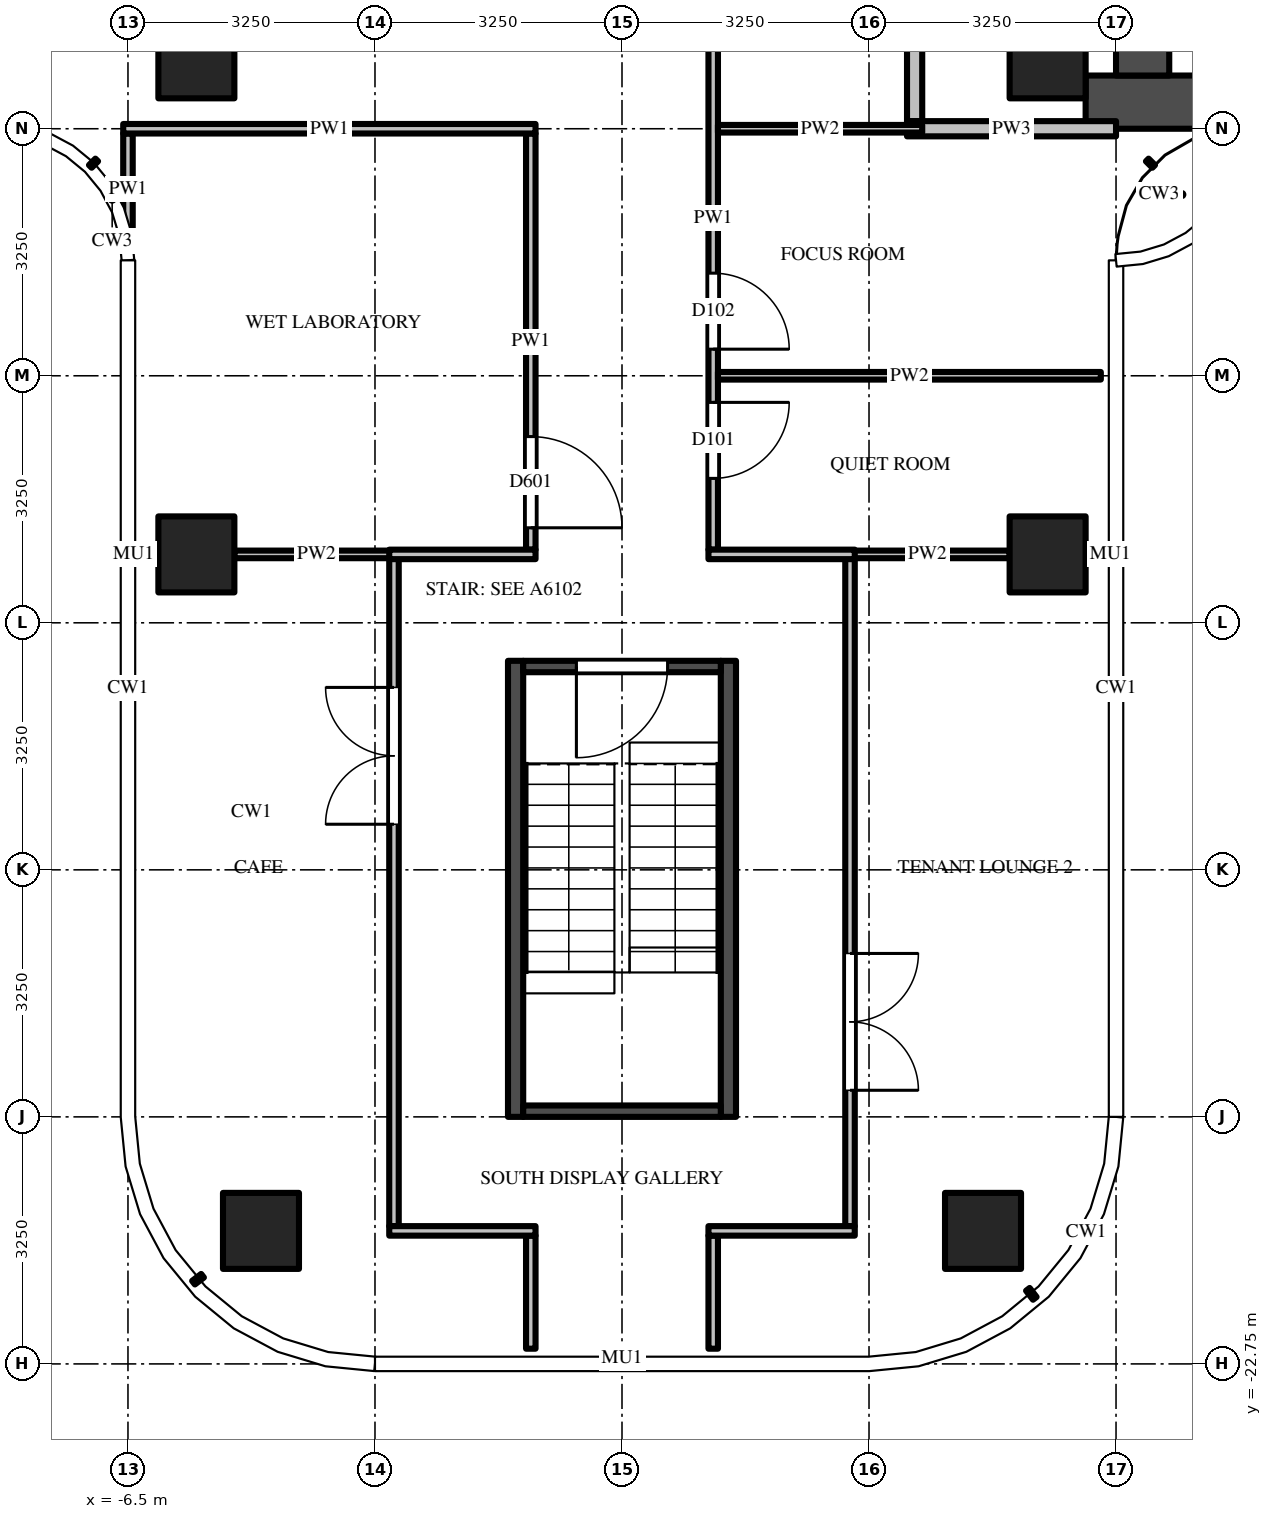
"""IFC4 building model, lengths in metres.
Left out: names, types, materials, properties, quantities, classifications, styles, units other than length and angle.
Written with IfcOpenShell. Run it as: python <this file> out.ifc"""

import sys

from ifc_helpers import new_model, si_unit, direction, frame, frame_2d, origin, origin_2d, place, context, subcontext, project, spatial, rectangle, extrude, source, transform, mapped, element, fill, save


model = new_model("IFC4")
c1 = context("Model", 3, precision=1e-05, world=origin(), true_north=direction((0.0, 1.0)))
c2 = subcontext(c1, "Body", "Model", "MODEL_VIEW")
j1 = project(units=[si_unit("LENGTHUNIT", "METRE"), si_unit("PLANEANGLEUNIT", "RADIAN")], contexts=[c1])
p1 = place(None, origin())
s1 = spatial("IfcSite", under=j1, at=p1, CompositionType="ELEMENT")
p2 = place(p1, origin())
s2 = spatial("IfcBuilding", under=s1, at=p2, CompositionType="ELEMENT")
p3 = place(p2, frame((0.0, 0.0, 295.0)))
s3 = spatial("IfcBuildingStorey", under=s2, at=p3, CompositionType="ELEMENT", Elevation=295.0)
m1 = source(origin(), c2, "Body", "SweptSolid", [
    extrude(rectangle(XDim=1.0, YDim=1.0, at=origin_2d()), origin(), (0.0, 0.0, 1.0), 3.9),
])
for number, where, z_axis, x_axis in (
    (1, (5.6, -5.6, 0.0), (0.0, 0.0, 1.0), (1.0, 0.0, 0.0)),
    (2, (-5.6, -5.6, 0.0), (0.0, 0.0, 1.0), (1.0, 0.0, 0.0)),
    (3, (5.6, -12.1, 0.0), (0.0, 0.0, 1.0), (1.0, 0.0, 0.0)),
    (4, (4.75, -21.0, 0.0), (0.0, 0.0, 1.0), (1.0, 0.0, 0.0)),
    (5, (-5.6, -12.1, 0.0), (0.0, 0.0, 1.0), (1.0, 0.0, 0.0)),
    (6, (-4.75, -21.0, 0.0), (0.0, 0.0, 1.0), (1.0, 0.0, 0.0)),
):
    element("IfcColumn", number, at=place(p3, frame(where, z_axis=z_axis, x_axis=x_axis)), inside=s3, PredefinedType="COLUMN", context=c2, shape_type="MappedRepresentation", body=[
        mapped(m1, transform((0.0, 0.0, 0.0))),
    ])
m2 = source(origin(), c2, "Body", "SweptSolid", [
    extrude(rectangle(XDim=16.65, YDim=0.7, at=frame_2d((8.325, 0.0))), origin(), (0.0, 0.0, 1.0), 3.7),
])
p4 = place(p3, frame((6.1, -6.15, 0.0), z_axis=(0.0, 0.0, 1.0), x_axis=(1.0, 0.0, 0.0)))
e7 = element("IfcWall", 7, at=p4, inside=s3, PredefinedType="SHEAR", context=c2, shape_type="MappedRepresentation", body=[
    mapped(m2, transform((0.0, 0.0, 0.0))),
])
m3 = source(origin(), c2, "Body", "SweptSolid", [
    extrude(rectangle(XDim=9.05, YDim=0.7, at=frame_2d((4.525, 0.0))), origin(), (0.0, 0.0, 1.0), 3.7),
])
p5 = place(p3, frame((6.85, -5.8, 0.0), z_axis=(0.0, 0.0, 1.0), x_axis=(0.0, 1.0, 0.0)))
e8 = element("IfcWall", 8, at=p5, inside=s3, PredefinedType="SHEAR", context=c2, shape_type="MappedRepresentation", body=[
    mapped(m3, transform((0.0, 0.0, 0.0))),
])
m4 = source(origin(), c2, "Body", "SweptSolid", [
    extrude(rectangle(XDim=1.8, YDim=2.1, at=frame_2d((0.9, 1.05))), frame((0.0, 0.36, 0.0), z_axis=(0.0, -1.0, 0.0), x_axis=(1.0, 0.0, 0.0)), (0.0, 0.0, 1.0), 0.72),
])
p6 = place(p5, frame((3.15, 0.0, 0.0)))
e9 = element("IfcOpeningElement", 9, at=p6, cuts=e8, PredefinedType="OPENING", context=c2, shape_type="MappedRepresentation", body=[
    mapped(m4, transform((0.0, 0.0, 0.0))),
])
m5 = source(origin(), c2, "Body", "SweptSolid", [
    extrude(rectangle(XDim=6.0, YDim=0.2, at=frame_2d((3.0, 0.0))), origin(), (0.0, 0.0, 1.0), 3.7),
])
for number, where, z_axis, x_axis in (
    (10, (1.4, -13.5, 0.0), (0.0, 0.0, 1.0), (0.0, -1.0, 0.0)),
    (11, (-1.4, -13.5, 0.0), (0.0, 0.0, 1.0), (0.0, -1.0, 0.0)),
):
    element("IfcWall", number, at=place(p3, frame(where, z_axis=z_axis, x_axis=x_axis)), inside=s3, PredefinedType="SHEAR", context=c2, shape_type="MappedRepresentation", body=[
        mapped(m5, transform((0.0, 0.0, 0.0))),
    ])
m6 = source(origin(), c2, "Body", "SweptSolid", [
    extrude(rectangle(XDim=2.6, YDim=0.15, at=frame_2d((1.3, 0.0))), origin(), (0.0, 0.0, 1.0), 3.7),
])
p7 = place(p3, frame((1.3, -13.575, 0.0), z_axis=(0.0, 0.0, 1.0), x_axis=(-1.0, 0.0, 0.0)))
e12 = element("IfcWall", 12, at=p7, inside=s3, PredefinedType="SHEAR", context=c2, shape_type="MappedRepresentation", body=[
    mapped(m6, transform((0.0, 0.0, 0.0))),
])
m7 = source(origin(), c2, "Body", "SweptSolid", [
    extrude(rectangle(XDim=1.2, YDim=2.1, at=frame_2d((0.6, 1.05))), frame((0.0, 0.085, 0.0), z_axis=(0.0, -1.0, 0.0), x_axis=(1.0, 0.0, 0.0)), (0.0, 0.0, 1.0), 0.17),
])
p8 = place(p7, frame((0.7, 0.0, 0.0)))
e13 = element("IfcOpeningElement", 13, at=p8, cuts=e12, PredefinedType="OPENING", context=c2, shape_type="MappedRepresentation", body=[
    mapped(m7, transform((0.0, 0.0, 0.0))),
])
p9 = place(p3, frame((1.3, -19.425, 0.0), z_axis=(0.0, 0.0, 1.0), x_axis=(-1.0, 0.0, 0.0)))
e14 = element("IfcWall", 14, at=p9, inside=s3, PredefinedType="SHEAR", context=c2, shape_type="MappedRepresentation", body=[
    mapped(m6, transform((0.0, 0.0, 0.0))),
])
m8 = source(origin(), c2, "Body", "SweptSolid", [
    extrude(rectangle(XDim=1.469, YDim=0.125, at=frame_2d((0.734, 0.0))), origin(), (0.0, 0.0, 1.0), 3.7),
])
p10 = place(p3, frame((-6.5, -6.562, 0.0), z_axis=(0.0, 0.0, 1.0), x_axis=(0.0, -1.0, 0.0)))
e15 = element("IfcWall", 15, at=p10, inside=s3, PredefinedType="PARTITIONING", context=c2, shape_type="MappedRepresentation", body=[
    mapped(m8, transform((0.0, 0.0, 0.0))),
])
m9 = source(origin(), c2, "Body", "SweptSolid", [
    extrude(rectangle(XDim=8.788, YDim=0.125, at=frame_2d((4.394, 0.0))), origin(), (0.0, 0.0, 1.0), 2.78),
])
p11 = place(p3, frame((-3.0, -20.938, 0.0), z_axis=(0.0, 0.0, 1.0), x_axis=(0.0, 1.0, 0.0)))
e16 = element("IfcWall", 16, at=p11, inside=s3, PredefinedType="PARTITIONING", context=c2, shape_type="MappedRepresentation", body=[
    mapped(m9, transform((0.0, 0.0, 0.0))),
])
m10 = source(origin(), c2, "Body", "SweptSolid", [
    extrude(rectangle(XDim=1.8, YDim=2.1, at=frame_2d((0.9, 1.05))), frame((0.0, 0.073, 0.0), z_axis=(0.0, -1.0, 0.0), x_axis=(1.0, 0.0, 0.0)), (0.0, 0.0, 1.0), 0.145),
])
p12 = place(p11, frame((5.288, 0.0, 0.0)))
e17 = element("IfcOpeningElement", 17, at=p12, cuts=e16, PredefinedType="OPENING", context=c2, shape_type="MappedRepresentation", body=[
    mapped(m10, transform((0.0, 0.0, 0.0))),
])
m11 = source(origin(), c2, "Body", "SweptSolid", [
    extrude(rectangle(XDim=1.488, YDim=0.125, at=frame_2d((0.744, 0.0))), origin(), (0.0, 0.0, 1.0), 2.78),
])
p13 = place(p3, frame((-1.2, -21.062, 0.0), z_axis=(0.0, 0.0, 1.0), x_axis=(0.0, -1.0, 0.0)))
e18 = element("IfcWall", 18, at=p13, inside=s3, PredefinedType="PARTITIONING", context=c2, shape_type="MappedRepresentation", body=[
    mapped(m11, transform((0.0, 0.0, 0.0))),
])
m12 = source(origin(), c2, "Body", "SweptSolid", [
    extrude(rectangle(XDim=5.475, YDim=0.125, at=frame_2d((2.738, 0.0))), origin(), (0.0, 0.0, 1.0), 2.997),
])
p14 = place(p3, frame((-1.2, -6.562, 0.0), z_axis=(0.0, 0.0, 1.0), x_axis=(0.0, -1.0, 0.0)))
e19 = element("IfcWall", 19, at=p14, inside=s3, PredefinedType="PARTITIONING", context=c2, shape_type="MappedRepresentation", body=[
    mapped(m12, transform((0.0, 0.0, 0.0))),
])
m13 = source(origin(), c2, "Body", "SweptSolid", [
    extrude(rectangle(XDim=1.2, YDim=2.1, at=frame_2d((0.6, 1.05))), frame((0.0, 0.073, 0.0), z_axis=(0.0, -1.0, 0.0), x_axis=(1.0, 0.0, 0.0)), (0.0, 0.0, 1.0), 0.145),
])
p15 = place(p14, frame((3.988, 0.0, 0.0)))
e20 = element("IfcOpeningElement", 20, at=p15, cuts=e19, PredefinedType="OPENING", context=c2, shape_type="MappedRepresentation", body=[
    mapped(m13, transform((0.0, 0.0, 0.0))),
])
p16 = place(p3, frame((1.2, -21.062, 0.0), z_axis=(0.0, 0.0, 1.0), x_axis=(0.0, -1.0, 0.0)))
e21 = element("IfcWall", 21, at=p16, inside=s3, PredefinedType="PARTITIONING", context=c2, shape_type="MappedRepresentation", body=[
    mapped(m11, transform((0.0, 0.0, 0.0))),
])
m14 = source(origin(), c2, "Body", "SweptSolid", [
    extrude(rectangle(XDim=8.725, YDim=0.125, at=frame_2d((4.363, 0.0))), origin(), (0.0, 0.0, 1.0), 2.997),
])
p17 = place(p3, frame((1.2, -3.312, 0.0), z_axis=(0.0, 0.0, 1.0), x_axis=(0.0, -1.0, 0.0)))
e22 = element("IfcWall", 22, at=p17, inside=s3, PredefinedType="PARTITIONING", context=c2, shape_type="MappedRepresentation", body=[
    mapped(m14, transform((0.0, 0.0, 0.0))),
])
m15 = source(origin(), c2, "Body", "SweptSolid", [
    extrude(rectangle(XDim=1.0, YDim=2.1, at=frame_2d((0.5, 1.05))), frame((0.0, 0.073, 0.0), z_axis=(0.0, -1.0, 0.0), x_axis=(1.0, 0.0, 0.0)), (0.0, 0.0, 1.0), 0.145),
])
p18 = place(p17, frame((6.788, 0.0, 0.0)))
e23 = element("IfcOpeningElement", 23, at=p18, cuts=e22, PredefinedType="OPENING", context=c2, shape_type="MappedRepresentation", body=[
    mapped(m15, transform((0.0, 0.0, 0.0))),
])
p19 = place(p17, frame((5.087, 0.0, 0.0)))
e24 = element("IfcOpeningElement", 24, at=p19, cuts=e22, PredefinedType="OPENING", context=c2, shape_type="MappedRepresentation", body=[
    mapped(m15, transform((0.0, 0.0, 0.0))),
])
m16 = source(origin(), c2, "Body", "SweptSolid", [
    extrude(rectangle(XDim=1.1, YDim=2.1, at=frame_2d((0.55, 1.05))), frame((0.0, 0.073, 0.0), z_axis=(0.0, -1.0, 0.0), x_axis=(1.0, 0.0, 0.0)), (0.0, 0.0, 1.0), 0.145),
])
p20 = place(p17, frame((0.288, 0.0, 0.0)))
e25 = element("IfcOpeningElement", 25, at=p20, cuts=e22, PredefinedType="OPENING", context=c2, shape_type="MappedRepresentation", body=[
    mapped(m16, transform((0.0, 0.0, 0.0))),
])
p21 = place(p3, frame((3.0, -12.15, 0.0), z_axis=(0.0, 0.0, 1.0), x_axis=(0.0, -1.0, 0.0)))
e26 = element("IfcWall", 26, at=p21, inside=s3, PredefinedType="PARTITIONING", context=c2, shape_type="MappedRepresentation", body=[
    mapped(m9, transform((0.0, 0.0, 0.0))),
])
p22 = place(p21, frame((5.2, 0.0, 0.0)))
e27 = element("IfcOpeningElement", 27, at=p22, cuts=e26, PredefinedType="OPENING", context=c2, shape_type="MappedRepresentation", body=[
    mapped(m10, transform((0.0, 0.0, 0.0))),
])
m17 = source(origin(), c2, "Body", "SweptSolid", [
    extrude(rectangle(XDim=3.087, YDim=0.2, at=frame_2d((1.544, 0.0))), origin(), (0.0, 0.0, 1.0), 2.997),
])
p23 = place(p3, frame((3.85, -6.4, 0.0), z_axis=(0.0, 0.0, 1.0), x_axis=(0.0, 1.0, 0.0)))
e28 = element("IfcWall", 28, at=p23, inside=s3, PredefinedType="PARTITIONING", context=c2, shape_type="MappedRepresentation", body=[
    mapped(m17, transform((0.0, 0.0, 0.0))),
])
m18 = source(origin(), c2, "Body", "SweptSolid", [
    extrude(rectangle(XDim=1.925, YDim=0.125, at=frame_2d((0.962, 0.0))), origin(), (0.0, 0.0, 1.0), 2.78),
])
for number, where, z_axis, x_axis in (
    (29, (-1.137, -21.0, 0.0), (0.0, 0.0, 1.0), (-1.0, 0.0, 0.0)),
    (30, (3.062, -21.0, 0.0), (0.0, 0.0, 1.0), (-1.0, 0.0, 0.0)),
):
    element("IfcWall", number, at=place(p3, frame(where, z_axis=z_axis, x_axis=x_axis)), inside=s3, PredefinedType="PARTITIONING", context=c2, shape_type="MappedRepresentation", body=[
        mapped(m18, transform((0.0, 0.0, 0.0))),
    ])
m19 = source(origin(), c2, "Body", "SweptSolid", [
    extrude(rectangle(XDim=2.163, YDim=0.1, at=frame_2d((1.081, 0.0))), origin(), (0.0, 0.0, 1.0), 2.997),
])
for number, where, z_axis, x_axis in (
    (31, (-5.1, -12.1, 0.0), (0.0, 0.0, 1.0), (1.0, 0.0, 0.0)),
    (32, (2.938, -12.1, 0.0), (0.0, 0.0, 1.0), (1.0, 0.0, 0.0)),
):
    element("IfcWall", number, at=place(p3, frame(where, z_axis=z_axis, x_axis=x_axis)), inside=s3, PredefinedType="PARTITIONING", context=c2, shape_type="MappedRepresentation", body=[
        mapped(m19, transform((0.0, 0.0, 0.0))),
    ])
m20 = source(origin(), c2, "Body", "SweptSolid", [
    extrude(rectangle(XDim=1.925, YDim=0.125, at=frame_2d((0.962, 0.0))), origin(), (0.0, 0.0, 1.0), 2.997),
])
for number, where, z_axis, x_axis in (
    (33, (-3.062, -12.1, 0.0), (0.0, 0.0, 1.0), (1.0, 0.0, 0.0)),
    (34, (1.137, -12.1, 0.0), (0.0, 0.0, 1.0), (1.0, 0.0, 0.0)),
):
    element("IfcWall", number, at=place(p3, frame(where, z_axis=z_axis, x_axis=x_axis)), inside=s3, PredefinedType="PARTITIONING", context=c2, shape_type="MappedRepresentation", body=[
        mapped(m20, transform((0.0, 0.0, 0.0))),
    ])
m21 = source(origin(), c2, "Body", "SweptSolid", [
    extrude(rectangle(XDim=5.038, YDim=0.1, at=frame_2d((2.519, 0.0))), origin(), (0.0, 0.0, 1.0), 2.78),
])
p24 = place(p3, frame((1.262, -9.75, 0.0), z_axis=(0.0, 0.0, 1.0), x_axis=(1.0, 0.0, 0.0)))
e35 = element("IfcWall", 35, at=p24, inside=s3, PredefinedType="PARTITIONING", context=c2, shape_type="MappedRepresentation", body=[
    mapped(m21, transform((0.0, 0.0, 0.0))),
])
m22 = source(origin(), c2, "Body", "SweptSolid", [
    extrude(rectangle(XDim=2.75, YDim=0.2, at=frame_2d((1.375, 0.0))), origin(), (0.0, 0.0, 1.0), 2.78),
])
p25 = place(p3, frame((3.75, -6.5, 0.0), z_axis=(0.0, 0.0, 1.0), x_axis=(1.0, 0.0, 0.0)))
e36 = element("IfcWall", 36, at=p25, inside=s3, PredefinedType="PARTITIONING", context=c2, shape_type="MappedRepresentation", body=[
    mapped(m22, transform((0.0, 0.0, 0.0))),
])
m23 = source(origin(), c2, "Body", "SweptSolid", [
    extrude(rectangle(XDim=2.688, YDim=0.1, at=frame_2d((1.344, 0.0))), origin(), (0.0, 0.0, 1.0), 3.7),
])
p26 = place(p3, frame((1.262, -6.5, 0.0), z_axis=(0.0, 0.0, 1.0), x_axis=(1.0, 0.0, 0.0)))
e37 = element("IfcWall", 37, at=p26, inside=s3, PredefinedType="PARTITIONING", context=c2, shape_type="MappedRepresentation", body=[
    mapped(m23, transform((0.0, 0.0, 0.0))),
])
m24 = source(origin(), c2, "Body", "SweptSolid", [
    extrude(rectangle(XDim=5.425, YDim=0.125, at=frame_2d((2.712, 0.0))), origin(), (0.0, 0.0, 1.0), 2.78),
])
p27 = place(p3, frame((-1.137, -6.5, 0.0), z_axis=(0.0, 0.0, 1.0), x_axis=(-1.0, 0.0, 0.0)))
e38 = element("IfcWall", 38, at=p27, inside=s3, PredefinedType="PARTITIONING", context=c2, shape_type="MappedRepresentation", body=[
    mapped(m24, transform((0.0, 0.0, 0.0))),
])
m25 = source(origin(), c2, "Body", "SweptSolid", [
    extrude(rectangle(XDim=1.2, YDim=2.1, at=frame_2d((0.6, 1.05))), frame((0.0, 0.025, 0.0), z_axis=(0.0, -1.0, 0.0), x_axis=(1.0, 0.0, 0.0)), (0.0, 0.0, 1.0), 0.05),
])
p28 = place(p8, origin())
e39 = element("IfcDoor", 39, at=p28, inside=s3, OperationType="SINGLE_SWING_RIGHT", PredefinedType="DOOR", context=c2, shape_type="MappedRepresentation", body=[
    mapped(m25, transform((0.0, 0.0, 0.0))),
])
fill(e13, e39)
m26 = source(origin(), c2, "Body", "SweptSolid", [
    extrude(rectangle(XDim=1.8, YDim=2.1, at=frame_2d((0.9, 1.05))), frame((0.0, 0.025, 0.0), z_axis=(0.0, -1.0, 0.0), x_axis=(1.0, 0.0, 0.0)), (0.0, 0.0, 1.0), 0.05),
])
p29 = place(p22, origin())
e40 = element("IfcDoor", 40, at=p29, inside=s3, OperationType="DOUBLE_DOOR_SINGLE_SWING", PredefinedType="DOOR", context=c2, shape_type="MappedRepresentation", body=[
    mapped(m26, transform((0.0, 0.0, 0.0))),
])
fill(e27, e40)
p30 = place(p12, origin())
e41 = element("IfcDoor", 41, at=p30, inside=s3, OperationType="DOUBLE_DOOR_SINGLE_SWING", PredefinedType="DOOR", context=c2, shape_type="MappedRepresentation", body=[
    mapped(m26, transform((0.0, 0.0, 0.0))),
])
fill(e17, e41)
p31 = place(p15, origin())
e42 = element("IfcDoor", 42, at=p31, inside=s3, OperationType="SINGLE_SWING_RIGHT", PredefinedType="DOOR", context=c2, shape_type="MappedRepresentation", body=[
    mapped(m25, transform((0.0, 0.0, 0.0))),
])
fill(e20, e42)
m27 = source(origin(), c2, "Body", "SweptSolid", [
    extrude(rectangle(XDim=1.0, YDim=2.1, at=frame_2d((0.5, 1.05))), frame((0.0, 0.025, 0.0), z_axis=(0.0, -1.0, 0.0), x_axis=(1.0, 0.0, 0.0)), (0.0, 0.0, 1.0), 0.05),
])
p32 = place(p18, origin())
e43 = element("IfcDoor", 43, at=p32, inside=s3, OperationType="SINGLE_SWING_LEFT", PredefinedType="DOOR", context=c2, shape_type="MappedRepresentation", body=[
    mapped(m27, transform((0.0, 0.0, 0.0))),
])
fill(e23, e43)
p33 = place(p19, origin())
e44 = element("IfcDoor", 44, at=p33, inside=s3, OperationType="SINGLE_SWING_RIGHT", PredefinedType="DOOR", context=c2, shape_type="MappedRepresentation", body=[
    mapped(m27, transform((0.0, 0.0, 0.0))),
])
fill(e24, e44)
save(model, sys.argv[1])
